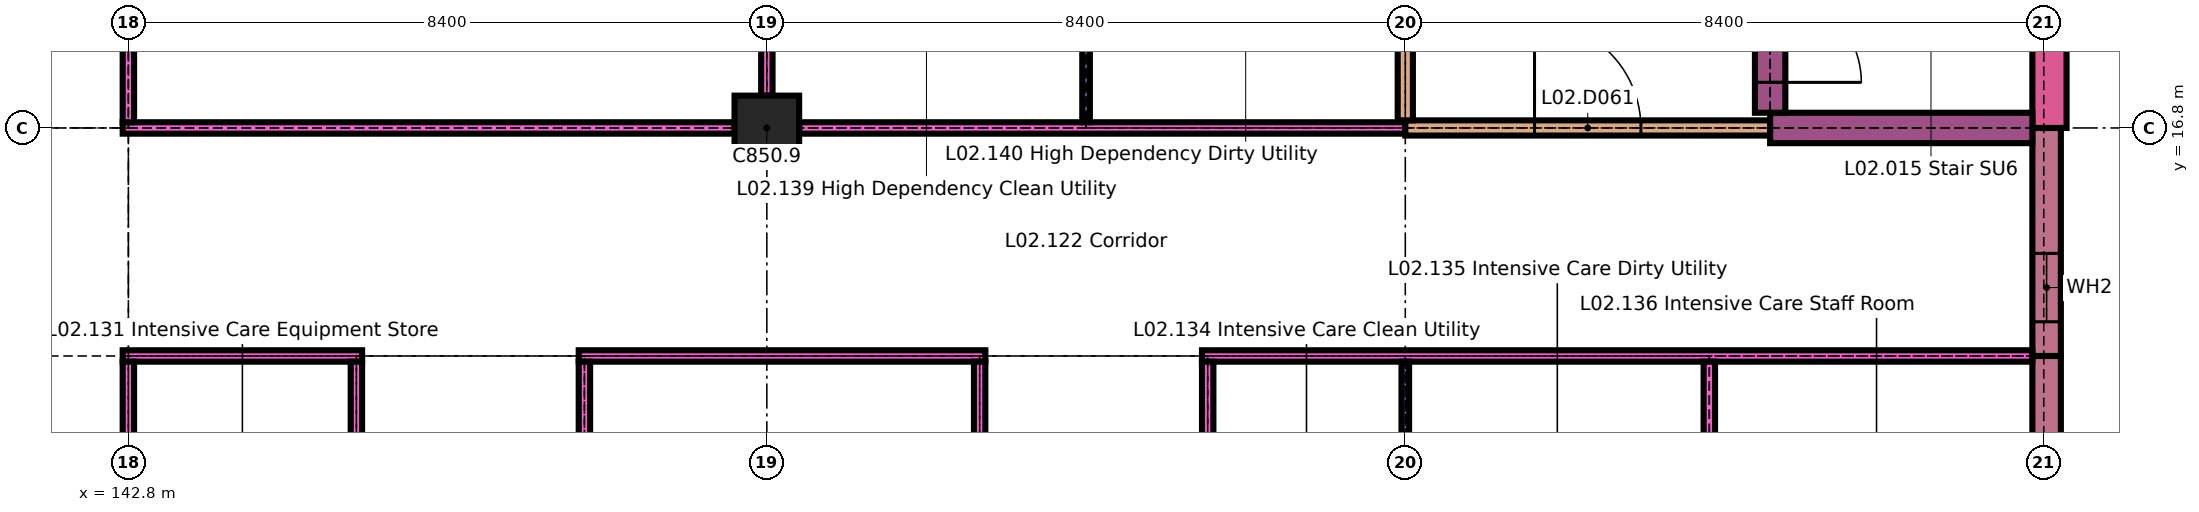
"""IFC4 building model, lengths in metres.
Left out: names, types, materials, properties, quantities, classifications, styles, units other than length and angle.
Written with IfcOpenShell. Run it as: python <this file> out.ifc"""

import sys

from ifc_helpers import new_model, si_unit, direction, frame, frame_2d, origin, origin_2d, place, context, subcontext, project, spatial, rectangle, extrude, element, fill, save


model = new_model("IFC4")
c1 = context("Model", 3, precision=1e-05, world=origin(), true_north=direction((0.0, 1.0)))
c2 = subcontext(c1, "Body", "Model", "MODEL_VIEW")
j1 = project(units=[si_unit("LENGTHUNIT", "METRE"), si_unit("PLANEANGLEUNIT", "RADIAN")], contexts=[c1])
p1 = place(None, origin())
s1 = spatial("IfcSite", under=j1, at=p1, CompositionType="ELEMENT")
p2 = place(p1, origin())
s2 = spatial("IfcBuilding", under=s1, at=p2, CompositionType="ELEMENT")
p3 = place(p2, frame((0.0, 0.0, 8.4)))
s3 = spatial("IfcBuildingStorey", under=s2, at=p3, CompositionType="ELEMENT", Elevation=8.4)
p4 = place(p3, frame((151.2, 16.8, 0.0), z_axis=(0.0, 0.0, 1.0), x_axis=(1.0, 0.0, 0.0)))
e1 = element("IfcColumn", 1, at=p4, inside=s3, PredefinedType="COLUMN", context=c2, shape_type="SweptSolid", body=[
    extrude(rectangle(XDim=0.85, YDim=0.85, at=origin_2d()), origin(), (0.0, 0.0, 1.0), 4.2),
])
p5 = place(p3, frame((168.038, 8.825, 0.0), z_axis=(0.0, 0.0, 1.0), x_axis=(0.0, 1.0, 0.0)))
e2 = element("IfcWall", 2, at=p5, inside=s3, PredefinedType="SOLIDWALL", context=c2, shape_type="SweptSolid", body=[
    extrude(rectangle(XDim=4.975, YDim=0.375, at=frame_2d((2.488, 0.0))), origin(), (0.0, 0.0, 1.0), 3.9),
])
p6 = place(p5, frame((0.625, 0.0, 0.9)))
e3 = element("IfcOpeningElement", 3, at=p6, cuts=e2, PredefinedType="OPENING", context=c2, shape_type="SweptSolid", body=[
    extrude(rectangle(XDim=2.1, YDim=2.1, at=frame_2d((1.05, 1.05))), frame((0.0, 0.198, 0.0), z_axis=(0.0, -1.0, 0.0), x_axis=(1.0, 0.0, 0.0)), (0.0, 0.0, 1.0), 0.395),
])
p7 = place(p3, frame((168.038, 13.8, 0.0), z_axis=(0.0, 0.0, 1.0), x_axis=(0.0, 1.0, 0.0)))
e4 = element("IfcWall", 4, at=p7, inside=s3, PredefinedType="SOLIDWALL", context=c2, shape_type="SweptSolid", body=[
    extrude(rectangle(XDim=3.0, YDim=0.375, at=frame_2d((1.5, 0.0))), origin(), (0.0, 0.0, 1.0), 3.9),
])
p8 = place(p7, frame((0.45, 0.0, 0.9)))
e5 = element("IfcOpeningElement", 5, at=p8, cuts=e4, PredefinedType="OPENING", context=c2, shape_type="SweptSolid", body=[
    extrude(rectangle(XDim=0.9, YDim=2.1, at=frame_2d((0.45, 1.05))), frame((0.0, 0.198, 0.0), z_axis=(0.0, -1.0, 0.0), x_axis=(1.0, 0.0, 0.0)), (0.0, 0.0, 1.0), 0.395),
])
p9 = place(p3, frame((168.075, 16.8, 0.0), z_axis=(0.0, 0.0, 1.0), x_axis=(0.0, 1.0, 0.0)))
e6 = element("IfcWall", 6, at=p9, inside=s3, PredefinedType="SOLIDWALL", context=c2, shape_type="SweptSolid", body=[
    extrude(rectangle(XDim=3.15, YDim=0.45, at=frame_2d((1.575, 0.0))), origin(), (0.0, 0.0, 1.0), 4.2),
])
p10 = place(p3, frame((142.725, 13.8, 0.0), z_axis=(0.0, 0.0, 1.0), x_axis=(1.0, 0.0, 0.0)))
e7 = element("IfcWall", 7, at=p10, inside=s3, PredefinedType="PARTITIONING", context=c2, shape_type="SweptSolid", body=[
    extrude(rectangle(XDim=3.15, YDim=0.15, at=frame_2d((1.575, 0.0))), origin(), (0.0, 0.0, 1.0), 4.2),
])
p11 = place(p3, frame((148.725, 13.8, 0.0), z_axis=(0.0, 0.0, 1.0), x_axis=(1.0, 0.0, 0.0)))
e8 = element("IfcWall", 8, at=p11, inside=s3, PredefinedType="PARTITIONING", context=c2, shape_type="SweptSolid", body=[
    extrude(rectangle(XDim=5.35, YDim=0.15, at=frame_2d((2.675, 0.0))), origin(), (0.0, 0.0, 1.0), 4.2),
])
p12 = place(p3, frame((156.925, 13.8, 0.0), z_axis=(0.0, 0.0, 1.0), x_axis=(1.0, 0.0, 0.0)))
e9 = element("IfcWall", 9, at=p12, inside=s3, PredefinedType="PARTITIONING", context=c2, shape_type="SweptSolid", body=[
    extrude(rectangle(XDim=10.925, YDim=0.15, at=frame_2d((5.462, 0.0))), origin(), (0.0, 0.0, 1.0), 4.2),
])
p13 = place(p3, frame((142.725, 16.8, 0.0), z_axis=(0.0, 0.0, 1.0), x_axis=(1.0, 0.0, 0.0)))
e10 = element("IfcWall", 10, at=p13, inside=s3, PredefinedType="PARTITIONING", context=c2, shape_type="SweptSolid", body=[
    extrude(rectangle(XDim=8.05, YDim=0.15, at=frame_2d((4.025, 0.0))), origin(), (0.0, 0.0, 1.0), 4.2),
])
p14 = place(p3, frame((151.625, 16.8, 0.0), z_axis=(0.0, 0.0, 1.0), x_axis=(1.0, 0.0, 0.0)))
e11 = element("IfcWall", 11, at=p14, inside=s3, PredefinedType="PARTITIONING", context=c2, shape_type="SweptSolid", body=[
    extrude(rectangle(XDim=7.975, YDim=0.15, at=frame_2d((3.988, 0.0))), origin(), (0.0, 0.0, 1.0), 4.2),
])
p15 = place(p3, frame((159.6, 16.8, 0.0), z_axis=(0.0, 0.0, 1.0), x_axis=(1.0, 0.0, 0.0)))
e12 = element("IfcWall", 12, at=p15, inside=s3, PredefinedType="PARTITIONING", context=c2, shape_type="SweptSolid", body=[
    extrude(rectangle(XDim=4.8, YDim=0.2, at=frame_2d((2.4, 0.0))), origin(), (0.0, 0.0, 1.0), 4.2),
])
p16 = place(p15, frame((1.7, 0.0, 0.0)))
e13 = element("IfcOpeningElement", 13, at=p16, cuts=e12, PredefinedType="OPENING", context=c2, shape_type="SweptSolid", body=[
    extrude(rectangle(XDim=1.4, YDim=2.1, at=frame_2d((0.7, 1.05))), frame((0.0, 0.11, 0.0), z_axis=(0.0, -1.0, 0.0), x_axis=(1.0, 0.0, 0.0)), (0.0, 0.0, 1.0), 0.22),
])
p17 = place(p3, frame((164.4, 16.8, 0.0), z_axis=(0.0, 0.0, 1.0), x_axis=(1.0, 0.0, 0.0)))
e14 = element("IfcWall", 14, at=p17, inside=s3, PredefinedType="SHEAR", context=c2, shape_type="SweptSolid", body=[
    extrude(rectangle(XDim=3.45, YDim=0.4, at=frame_2d((1.725, 0.0))), origin(), (0.0, 0.0, 1.0), 4.2),
])
p18 = place(p3, frame((142.8, 8.5, 0.0), z_axis=(0.0, 0.0, 1.0), x_axis=(0.0, 1.0, 0.0)))
e15 = element("IfcWall", 15, at=p18, inside=s3, PredefinedType="PARTITIONING", context=c2, shape_type="SweptSolid", body=[
    extrude(rectangle(XDim=5.225, YDim=0.15, at=frame_2d((2.613, 0.0))), origin(), (0.0, 0.0, 1.0), 4.2),
])
p19 = place(p3, frame((142.8, 16.875, 0.0), z_axis=(0.0, 0.0, 1.0), x_axis=(0.0, 1.0, 0.0)))
e16 = element("IfcWall", 16, at=p19, inside=s3, PredefinedType="PARTITIONING", context=c2, shape_type="SweptSolid", body=[
    extrude(rectangle(XDim=4.725, YDim=0.15, at=frame_2d((2.363, 0.0))), origin(), (0.0, 0.0, 1.0), 4.2),
])
p20 = place(p3, frame((145.8, 8.475, 0.0), z_axis=(0.0, 0.0, 1.0), x_axis=(0.0, 1.0, 0.0)))
e17 = element("IfcWall", 17, at=p20, inside=s3, PredefinedType="PARTITIONING", context=c2, shape_type="SweptSolid", body=[
    extrude(rectangle(XDim=5.25, YDim=0.15, at=frame_2d((2.625, 0.0))), origin(), (0.0, 0.0, 1.0), 4.2),
])
p21 = place(p3, frame((148.8, 8.4, 0.0), z_axis=(0.0, 0.0, 1.0), x_axis=(0.0, 1.0, 0.0)))
e18 = element("IfcWall", 18, at=p21, inside=s3, PredefinedType="PARTITIONING", context=c2, shape_type="SweptSolid", body=[
    extrude(rectangle(XDim=5.325, YDim=0.15, at=frame_2d((2.663, 0.0))), origin(), (0.0, 0.0, 1.0), 4.2),
])
p22 = place(p3, frame((151.2, 17.225, 0.0), z_axis=(0.0, 0.0, 1.0), x_axis=(0.0, 1.0, 0.0)))
e19 = element("IfcWall", 19, at=p22, inside=s3, PredefinedType="PARTITIONING", context=c2, shape_type="SweptSolid", body=[
    extrude(rectangle(XDim=7.55, YDim=0.15, at=frame_2d((3.775, 0.0))), origin(), (0.0, 0.0, 1.0), 4.2),
])
p23 = place(p3, frame((154.0, 8.4, 0.0), z_axis=(0.0, 0.0, 1.0), x_axis=(0.0, 1.0, 0.0)))
e20 = element("IfcWall", 20, at=p23, inside=s3, PredefinedType="PARTITIONING", context=c2, shape_type="SweptSolid", body=[
    extrude(rectangle(XDim=5.325, YDim=0.15, at=frame_2d((2.663, 0.0))), origin(), (0.0, 0.0, 1.0), 4.2),
])
p24 = place(p3, frame((155.4, 16.875, 0.0), z_axis=(0.0, 0.0, 1.0), x_axis=(0.0, 1.0, 0.0)))
e21 = element("IfcWall", 21, at=p24, inside=s3, PredefinedType="PARTITIONING", context=c2, shape_type="SweptSolid", body=[
    extrude(rectangle(XDim=8.25, YDim=0.1, at=frame_2d((4.125, 0.0))), origin(), (0.0, 0.0, 1.0), 4.2),
])
p25 = place(p3, frame((157.0, 8.475, 0.0), z_axis=(0.0, 0.0, 1.0), x_axis=(0.0, 1.0, 0.0)))
e22 = element("IfcWall", 22, at=p25, inside=s3, PredefinedType="PARTITIONING", context=c2, shape_type="SweptSolid", body=[
    extrude(rectangle(XDim=5.25, YDim=0.15, at=frame_2d((2.625, 0.0))), origin(), (0.0, 0.0, 1.0), 4.2),
])
p26 = place(p3, frame((159.6, 8.825, 0.0), z_axis=(0.0, 0.0, 1.0), x_axis=(0.0, 1.0, 0.0)))
e23 = element("IfcWall", 23, at=p26, inside=s3, PredefinedType="PARTITIONING", context=c2, shape_type="SweptSolid", body=[
    extrude(rectangle(XDim=4.9, YDim=0.1, at=frame_2d((2.45, 0.0))), origin(), (0.0, 0.0, 1.0), 4.2),
])
p27 = place(p3, frame((159.6, 16.9, 0.0), z_axis=(0.0, 0.0, 1.0), x_axis=(0.0, 1.0, 0.0)))
e24 = element("IfcWall", 24, at=p27, inside=s3, PredefinedType="PARTITIONING", context=c2, shape_type="SweptSolid", body=[
    extrude(rectangle(XDim=8.2, YDim=0.2, at=frame_2d((4.1, 0.0))), origin(), (0.0, 0.0, 1.0), 4.2),
])
p28 = place(p3, frame((163.6, 8.475, 0.0), z_axis=(0.0, 0.0, 1.0), x_axis=(0.0, 1.0, 0.0)))
e25 = element("IfcWall", 25, at=p28, inside=s3, PredefinedType="PARTITIONING", context=c2, shape_type="SweptSolid", body=[
    extrude(rectangle(XDim=5.25, YDim=0.15, at=frame_2d((2.625, 0.0))), origin(), (0.0, 0.0, 1.0), 4.2),
])
p29 = place(p3, frame((164.4, 17.0, 0.0), z_axis=(0.0, 0.0, 1.0), x_axis=(0.0, 1.0, 0.0)))
e26 = element("IfcWall", 26, at=p29, inside=s3, PredefinedType="SHEAR", context=c2, shape_type="SweptSolid", body=[
    extrude(rectangle(XDim=8.0, YDim=0.4, at=frame_2d((4.0, 0.0))), origin(), (0.0, 0.0, 1.0), 4.2),
])
p30 = place(p29, frame((0.4, 0.0, 0.0)))
e27 = element("IfcOpeningElement", 27, at=p30, cuts=e26, PredefinedType="OPENING", context=c2, shape_type="SweptSolid", body=[
    extrude(rectangle(XDim=1.2, YDim=2.1, at=frame_2d((0.6, 1.05))), frame((0.0, 0.21, 0.0), z_axis=(0.0, -1.0, 0.0), x_axis=(1.0, 0.0, 0.0)), (0.0, 0.0, 1.0), 0.42),
])
p31 = place(p8, origin())
e28 = element("IfcWindow", 28, at=p31, inside=s3, PartitioningType="SINGLE_PANEL", PredefinedType="WINDOW", context=c2, shape_type="SweptSolid", body=[
    extrude(rectangle(XDim=0.9, YDim=2.1, at=frame_2d((0.45, 1.05))), frame((0.0, 0.03, 0.0), z_axis=(0.0, -1.0, 0.0), x_axis=(1.0, 0.0, 0.0)), (0.0, 0.0, 1.0), 0.06),
])
fill(e5, e28)
p32 = place(p16, origin())
e29 = element("IfcDoor", 29, at=p32, inside=s3, OperationType="SINGLE_SWING_RIGHT", PredefinedType="DOOR", context=c2, shape_type="SweptSolid", body=[
    extrude(rectangle(XDim=1.4, YDim=2.1, at=frame_2d((0.7, 1.05))), frame((0.0, 0.03, 0.0), z_axis=(0.0, -1.0, 0.0), x_axis=(1.0, 0.0, 0.0)), (0.0, 0.0, 1.0), 0.06),
])
fill(e13, e29)
p33 = place(p30, origin())
e30 = element("IfcDoor", 30, at=p33, inside=s3, OperationType="SINGLE_SWING_LEFT", PredefinedType="DOOR", context=c2, shape_type="SweptSolid", body=[
    extrude(rectangle(XDim=1.2, YDim=2.1, at=frame_2d((0.6, 1.05))), frame((0.0, 0.025, 0.0), z_axis=(0.0, -1.0, 0.0), x_axis=(1.0, 0.0, 0.0)), (0.0, 0.0, 1.0), 0.05),
])
fill(e27, e30)
save(model, sys.argv[1])
